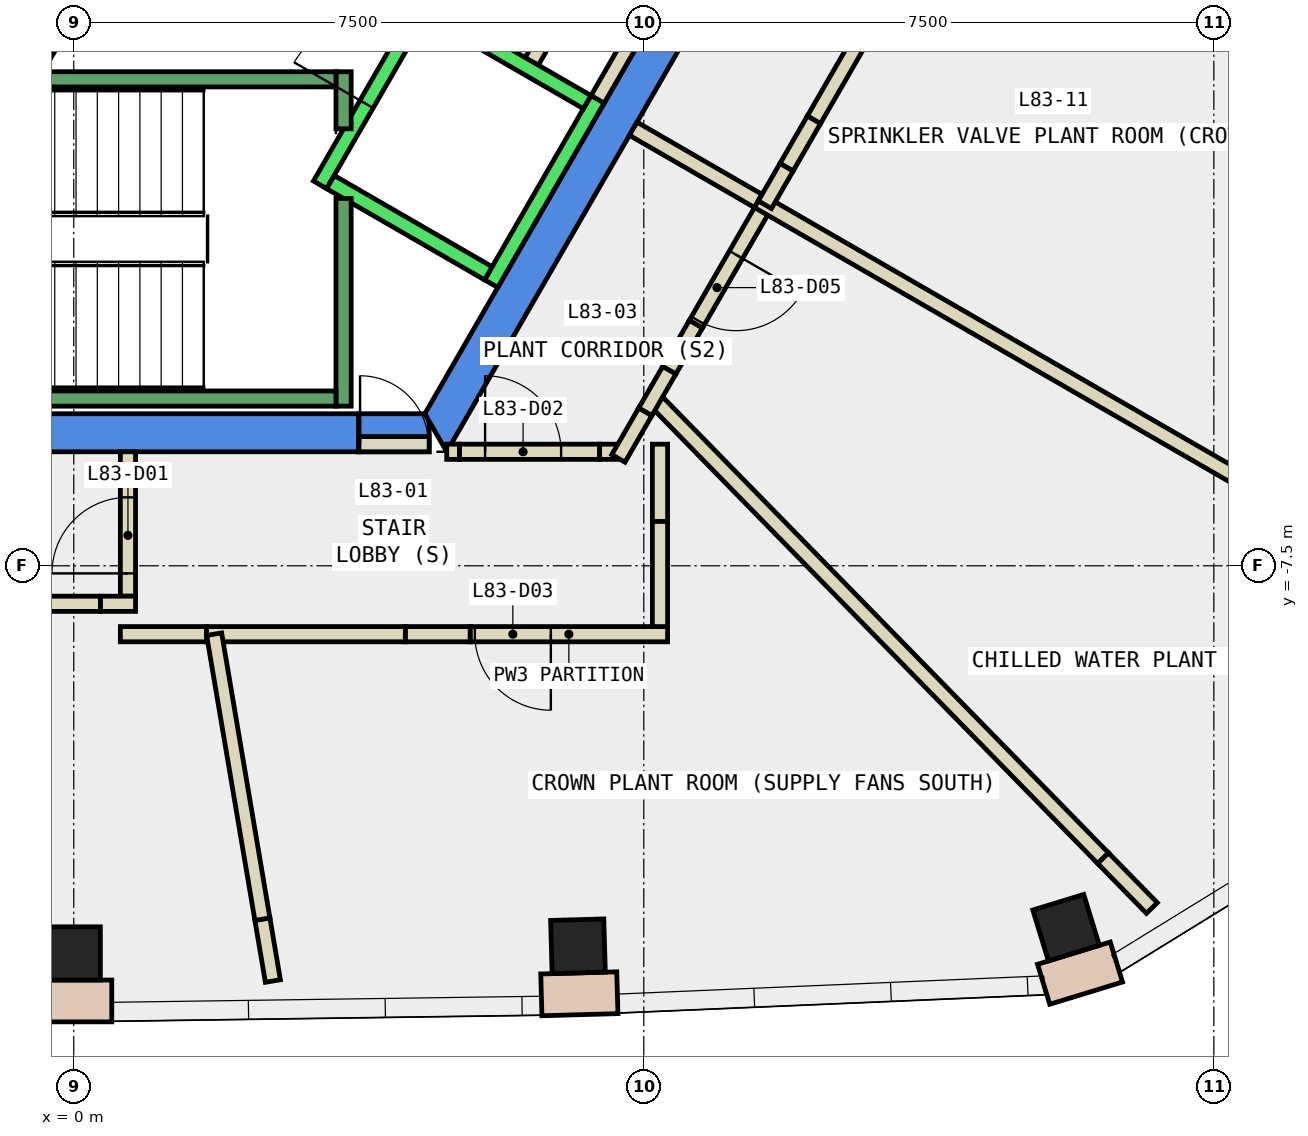
"""IFC4 building model, lengths in metres.
Left out: names, types, materials, properties, quantities, classifications, styles, units other than length and angle.
Written with IfcOpenShell. Run it as: python <this file> out.ifc"""

import sys

from ifc_helpers import new_model, si_unit, direction, frame, frame_2d, origin, origin_2d, place, context, subcontext, project, spatial, polyline, rectangle, outline, extrude, element, fill, save


model = new_model("IFC4")
c1 = context("Model", 3, precision=1e-05, world=origin(), true_north=direction((0.0, 1.0)))
c2 = subcontext(c1, "Body", "Model", "MODEL_VIEW")
j1 = project(units=[si_unit("LENGTHUNIT", "METRE"), si_unit("PLANEANGLEUNIT", "RADIAN")], contexts=[c1])
p1 = place(None, origin())
s1 = spatial("IfcSite", under=j1, at=p1, CompositionType="ELEMENT")
p2 = place(p1, origin())
s2 = spatial("IfcBuilding", under=s1, at=p2, CompositionType="ELEMENT")
p3 = place(p2, frame((0.0, 0.0, 353.9)))
s3 = spatial("IfcBuildingStorey", under=s2, at=p3, CompositionType="ELEMENT", Elevation=353.9)
for number, where, z_axis, x_axis in (
    (1, (0.0, -12.6, -0.35), (0.0, 0.0, 1.0), (1.0, 0.0, 0.0)),
    (2, (6.634, -12.506, -0.35), (0.0, 0.0, 1.0), (1.0, 0.028, 0.0)),
    (3, (13.056, -12.261, -0.35), (0.0, 0.0, 1.0), (0.956, 0.293, 0.0)),
):
    element("IfcColumn", number, at=place(p3, frame(where, z_axis=z_axis, x_axis=x_axis)), inside=s3, PredefinedType="COLUMN", context=c2, shape_type="SweptSolid", body=[
        extrude(rectangle(XDim=0.7, YDim=0.7, at=origin_2d()), origin(), (0.0, 0.0, 1.0), 4.4),
    ])
p4 = place(p3, frame((0.0, 0.0, -0.35)))
e4 = element("IfcWall", 4, at=p4, inside=s3, PredefinedType="SHEAR", context=c2, shape_type="SweptSolid", body=[
    extrude(outline(polyline([(3.75, -6.0), (3.75, -5.5), (-4.619, -5.5), (-4.907, -6.0), (3.75, -6.0)])), origin(), (0.0, 0.0, 1.0), 4.4),
])
p5 = place(p3, frame((0.0, 0.0, 3.6)))
e5 = element("IfcWall", 5, at=p5, inside=s3, PredefinedType="SHEAR", context=c2, shape_type="SweptSolid", body=[
    extrude(outline(polyline([(4.676, -6.0), (4.676, -5.6), (4.619, -5.5), (3.75, -5.5), (3.75, -6.0), (4.676, -6.0)])), origin(), (0.0, 0.0, 1.0), 0.45),
])
p6 = place(p3, frame((0.0, 0.0, -0.35)))
e6 = element("IfcWall", 6, at=p6, inside=s3, PredefinedType="SHEAR", context=c2, shape_type="SweptSolid", body=[
    extrude(outline(polyline([(4.907, -6.0), (9.815, 2.5), (9.238, 2.5), (4.619, -5.5), (4.907, -6.0)])), origin(), (0.0, 0.0, 1.0), 4.4),
])
p7 = place(p3, frame((-0.5, -13.225, 0.0), z_axis=(0.0, 0.0, 1.0), x_axis=(1.0, 0.0, 0.0)))
e7 = element("IfcWall", 7, at=p7, inside=s3, PredefinedType="STANDARD", context=c2, shape_type="SweptSolid", body=[
    extrude(rectangle(XDim=1.0, YDim=0.55, at=frame_2d((0.5, 0.0))), origin(), (0.0, 0.0, 1.0), 4.05),
])
p8 = place(p3, frame((6.152, -13.145, 0.0), z_axis=(0.0, 0.0, 1.0), x_axis=(0.999606097148, 0.028065112591, 0.0)))
e8 = element("IfcWall", 8, at=p8, inside=s3, PredefinedType="STANDARD", context=c2, shape_type="SweptSolid", body=[
    extrude(rectangle(XDim=1.0, YDim=0.55, at=frame_2d((0.5, 0.0))), origin(), (0.0, 0.0, 1.0), 4.05),
])
p9 = place(p3, frame((12.761, -13.006, 0.0), z_axis=(0.0, 0.0, 1.0), x_axis=(0.95613166039, 0.292937276563, 0.0)))
e9 = element("IfcWall", 9, at=p9, inside=s3, PredefinedType="STANDARD", context=c2, shape_type="SweptSolid", body=[
    extrude(rectangle(XDim=1.001, YDim=0.55, at=frame_2d((0.5, 0.0))), origin(), (0.0, 0.0, 1.0), 4.05),
])
p10 = place(p3, frame((6.826, 0.522, 0.0), z_axis=(0.0, 0.0, 1.0), x_axis=(-0.500016722714, -0.866015748706, 0.0)))
e10 = element("IfcWall", 10, at=p10, inside=s3, PredefinedType="PARTITIONING", context=c2, shape_type="SweptSolid", body=[
    extrude(rectangle(XDim=1.7, YDim=0.2, at=frame_2d((0.85, 0.0))), origin(), (0.0, 0.0, 1.0), 4.05),
])
p11 = place(p3, frame((8.192, 0.888, 0.0), z_axis=(0.0, 0.0, 1.0), x_axis=(-0.499940625693, -0.866059680843, 0.0)))
e11 = element("IfcWall", 11, at=p11, inside=s3, PredefinedType="PARTITIONING", context=c2, shape_type="SweptSolid", body=[
    extrude(rectangle(XDim=2.68, YDim=0.2, at=frame_2d((1.34, 0.0))), origin(), (0.0, 0.0, 1.0), 4.05),
])
p12 = place(p3, frame((-0.52, -1.0, 0.0), z_axis=(0.0, 0.0, 1.0), x_axis=(0.50011622646, 0.865958290007, 0.0)))
e12 = element("IfcWall", 12, at=p12, inside=s3, PredefinedType="PARTITIONING", context=c2, shape_type="SweptSolid", body=[
    extrude(rectangle(XDim=4.991, YDim=0.2, at=frame_2d((2.496, 0.0))), origin(), (0.0, 0.0, 1.0), 4.05),
])
p13 = place(p12, frame((1.945, 0.0, 0.0)))
e13 = element("IfcOpeningElement", 13, at=p13, cuts=e12, PredefinedType="OPENING", context=c2, shape_type="SweptSolid", body=[
    extrude(rectangle(XDim=1.0, YDim=2.1, at=frame_2d((0.5, 1.05))), frame((0.0, 0.11, 0.0), z_axis=(0.0, -1.0, 0.0), x_axis=(1.0, 0.0, 0.0)), (0.0, 0.0, 1.0), 0.22),
])
p14 = place(p3, frame((0.713, -7.9, 0.0), z_axis=(0.0, 0.0, 1.0), x_axis=(0.0, 1.0, 0.0)))
e14 = element("IfcWall", 14, at=p14, inside=s3, PredefinedType="PARTITIONING", context=c2, shape_type="SweptSolid", body=[
    extrude(rectangle(XDim=1.9, YDim=0.2, at=frame_2d((0.95, 0.0))), origin(), (0.0, 0.0, 1.0), 4.05),
])
p15 = place(p14, frame((0.3, 0.0, 0.0)))
e15 = element("IfcOpeningElement", 15, at=p15, cuts=e14, PredefinedType="OPENING", context=c2, shape_type="SweptSolid", body=[
    extrude(rectangle(XDim=1.0, YDim=2.1, at=frame_2d((0.5, 1.05))), frame((0.0, 0.11, 0.0), z_axis=(0.0, -1.0, 0.0), x_axis=(1.0, 0.0, 0.0)), (0.0, 0.0, 1.0), 0.22),
])
p16 = place(p3, frame((4.907, -6.0, 0.0), z_axis=(0.0, 0.0, 1.0), x_axis=(1.0, 0.0, 0.0)))
e16 = element("IfcWall", 16, at=p16, inside=s3, PredefinedType="PARTITIONING", context=c2, shape_type="SweptSolid", body=[
    extrude(rectangle(XDim=0.169, YDim=0.2, at=frame_2d((0.084, 0.0))), origin(), (0.0, 0.0, 1.0), 2.4),
])
p17 = place(p3, frame((7.813, -8.4, 0.0), z_axis=(0.0, 0.0, 1.0), x_axis=(-1.0, 0.0, 0.0)))
e17 = element("IfcWall", 17, at=p17, inside=s3, PredefinedType="PARTITIONING", context=c2, shape_type="SweptSolid", body=[
    extrude(rectangle(XDim=2.598, YDim=0.2, at=frame_2d((1.299, 0.0))), origin(), (0.0, 0.0, 1.0), 4.05),
])
p18 = place(p17, frame((1.536, 0.0, 0.0)))
e18 = element("IfcOpeningElement", 18, at=p18, cuts=e17, PredefinedType="OPENING", context=c2, shape_type="SweptSolid", body=[
    extrude(rectangle(XDim=1.0, YDim=2.1, at=frame_2d((0.5, 1.05))), frame((0.0, 0.11, 0.0), z_axis=(0.0, -1.0, 0.0), x_axis=(1.0, 0.0, 0.0)), (0.0, 0.0, 1.0), 0.22),
])
p19 = place(p3, frame((7.713, -5.9, 0.0), z_axis=(0.0, 0.0, 1.0), x_axis=(0.0, -1.0, 0.0)))
e19 = element("IfcWall", 19, at=p19, inside=s3, PredefinedType="PARTITIONING", context=c2, shape_type="SweptSolid", body=[
    extrude(rectangle(XDim=1.017, YDim=0.2, at=frame_2d((0.509, 0.0))), origin(), (0.0, 0.0, 1.0), 1.95),
])
p20 = place(p3, frame((1.747, -8.4, 0.0), z_axis=(0.0, 0.0, 1.0), x_axis=(-1.0, 0.0, 0.0)))
e20 = element("IfcWall", 20, at=p20, inside=s3, PredefinedType="PARTITIONING", context=c2, shape_type="SweptSolid", body=[
    extrude(rectangle(XDim=1.134, YDim=0.2, at=frame_2d((0.567, 0.0))), origin(), (0.0, 0.0, 1.0), 4.05),
])
p21 = place(p3, frame((0.813, -8.0, 0.0), z_axis=(0.0, 0.0, 1.0), x_axis=(-1.0, 0.0, 0.0)))
e21 = element("IfcWall", 21, at=p21, inside=s3, PredefinedType="PARTITIONING", context=c2, shape_type="SweptSolid", body=[
    extrude(rectangle(XDim=0.463, YDim=0.2, at=frame_2d((0.231, 0.0))), origin(), (0.0, 0.0, 1.0), 4.05),
])
p22 = place(p3, frame((9.093, -2.75, 0.0), z_axis=(0.0, 0.0, 1.0), x_axis=(-0.500145398563, -0.865941441609, 0.0)))
e22 = element("IfcWall", 22, at=p22, inside=s3, PredefinedType="PARTITIONING", context=c2, shape_type="SweptSolid", body=[
    extrude(rectangle(XDim=1.815, YDim=0.2, at=frame_2d((0.908, 0.0))), origin(), (0.0, 0.0, 1.0), 4.05),
])
p23 = place(p22, frame((0.759, 0.0, 0.0)))
e23 = element("IfcOpeningElement", 23, at=p23, cuts=e22, PredefinedType="OPENING", context=c2, shape_type="SweptSolid", body=[
    extrude(rectangle(XDim=1.0, YDim=2.1, at=frame_2d((0.5, 1.05))), frame((0.0, 0.11, 0.0), z_axis=(0.0, -1.0, 0.0), x_axis=(1.0, 0.0, 0.0)), (0.0, 0.0, 1.0), 0.22),
])
p24 = place(p3, frame((7.361, -1.75, 0.0), z_axis=(0.0, 0.0, 1.0), x_axis=(0.865980106173, -0.500078449558, 0.0)))
e24 = element("IfcWall", 24, at=p24, inside=s3, PredefinedType="PARTITIONING", context=c2, shape_type="SweptSolid", body=[
    extrude(rectangle(XDim=1.9, YDim=0.2, at=frame_2d((0.95, 0.0))), origin(), (0.0, 0.0, 1.0), 4.05),
])
p25 = place(p3, frame((2.62, -12.963, 0.0), z_axis=(0.0, 0.0, 1.0), x_axis=(-0.167371315192, 0.985893930832, 0.0)))
e25 = element("IfcWall", 25, at=p25, inside=s3, PredefinedType="PARTITIONING", context=c2, shape_type="SweptSolid", body=[
    extrude(rectangle(XDim=0.826, YDim=0.2, at=frame_2d((0.413, 0.0))), origin(), (0.0, 0.0, 1.0), 1.95),
])
p26 = place(p3, frame((7.624, -5.295, 0.0), z_axis=(0.0, 0.0, 1.0), x_axis=(0.699204125851, -0.714922086938, 0.0)))
e26 = element("IfcWall", 26, at=p26, inside=s3, PredefinedType="PARTITIONING", context=c2, shape_type="SweptSolid", body=[
    extrude(rectangle(XDim=8.465, YDim=0.2, at=frame_2d((4.233, 0.0))), origin(), (0.0, 0.0, 1.0), 4.05),
])
p27 = place(p3, frame((9.006, -2.7, 0.0), z_axis=(0.0, 0.0, 1.0), x_axis=(0.866026229868, -0.499998569178, 0.0)))
e27 = element("IfcWall", 27, at=p27, inside=s3, PredefinedType="PARTITIONING", context=c2, shape_type="SweptSolid", body=[
    extrude(rectangle(XDim=8.572, YDim=0.2, at=frame_2d((4.286, 0.0))), origin(), (0.0, 0.0, 1.0), 4.05),
])
p28 = place(p3, frame((3.75, -5.9, 0.0), z_axis=(0.0, 0.0, 1.0), x_axis=(1.0, 0.0, 0.0)))
e28 = element("IfcWall", 28, at=p28, inside=s3, PredefinedType="PARTITIONING", context=c2, shape_type="SweptSolid", body=[
    extrude(rectangle(XDim=0.926, YDim=0.2, at=frame_2d((0.463, 0.0))), origin(), (0.0, 0.0, 1.0), 2.4),
])
p29 = place(p28, frame((0.017, 0.0, 0.0)))
e29 = element("IfcOpeningElement", 29, at=p29, cuts=e28, PredefinedType="OPENING", context=c2, shape_type="SweptSolid", body=[
    extrude(rectangle(XDim=0.9, YDim=2.1, at=frame_2d((0.45, 1.05))), frame((0.0, 0.11, 0.0), z_axis=(0.0, -1.0, 0.0), x_axis=(1.0, 0.0, 0.0)), (0.0, 0.0, 1.0), 0.22),
])
p30 = place(p3, frame((5.076, -6.0, 0.0), z_axis=(0.0, 0.0, 1.0), x_axis=(1.0, 0.0, 0.0)))
e30 = element("IfcWall", 30, at=p30, inside=s3, PredefinedType="PARTITIONING", context=c2, shape_type="SweptSolid", body=[
    extrude(rectangle(XDim=1.843, YDim=0.2, at=frame_2d((0.921, 0.0))), origin(), (0.0, 0.0, 1.0), 4.05),
])
p31 = place(p30, frame((0.336, 0.0, 0.0)))
e31 = element("IfcOpeningElement", 31, at=p31, cuts=e30, PredefinedType="OPENING", context=c2, shape_type="SweptSolid", body=[
    extrude(rectangle(XDim=1.0, YDim=2.1, at=frame_2d((0.5, 1.05))), frame((0.0, 0.11, 0.0), z_axis=(0.0, -1.0, 0.0), x_axis=(1.0, 0.0, 0.0)), (0.0, 0.0, 1.0), 0.22),
])
p32 = place(p3, frame((6.919, -6.0, 0.0), z_axis=(0.0, 0.0, 1.0), x_axis=(1.0, 0.0, 0.0)))
e32 = element("IfcWall", 32, at=p32, inside=s3, PredefinedType="PARTITIONING", context=c2, shape_type="SweptSolid", body=[
    extrude(rectangle(XDim=0.242, YDim=0.2, at=frame_2d((0.121, 0.0))), origin(), (0.0, 0.0, 1.0), 1.95),
])
p33 = place(p3, frame((5.215, -8.4, 0.0), z_axis=(0.0, 0.0, 1.0), x_axis=(-1.0, 0.0, 0.0)))
e33 = element("IfcWall", 33, at=p33, inside=s3, PredefinedType="PARTITIONING", context=c2, shape_type="SweptSolid", body=[
    extrude(rectangle(XDim=0.853, YDim=0.2, at=frame_2d((0.427, 0.0))), origin(), (0.0, 0.0, 1.0), 1.95),
])
p34 = place(p3, frame((4.362, -8.4, 0.0), z_axis=(0.0, 0.0, 1.0), x_axis=(-1.0, 0.0, 0.0)))
e34 = element("IfcWall", 34, at=p34, inside=s3, PredefinedType="PARTITIONING", context=c2, shape_type="SweptSolid", body=[
    extrude(rectangle(XDim=2.615, YDim=0.2, at=frame_2d((1.308, 0.0))), origin(), (0.0, 0.0, 1.0), 4.05),
])
p35 = place(p3, frame((7.713, -6.917, 0.0), z_axis=(0.0, 0.0, 1.0), x_axis=(0.0, -1.0, 0.0)))
e35 = element("IfcWall", 35, at=p35, inside=s3, PredefinedType="PARTITIONING", context=c2, shape_type="SweptSolid", body=[
    extrude(rectangle(XDim=1.383, YDim=0.2, at=frame_2d((0.691, 0.0))), origin(), (0.0, 0.0, 1.0), 4.05),
])
p36 = place(p3, frame((0.35, -8.0, 0.0), z_axis=(0.0, 0.0, 1.0), x_axis=(-1.0, 0.0, 0.0)))
e36 = element("IfcWall", 36, at=p36, inside=s3, PredefinedType="PARTITIONING", context=c2, shape_type="SweptSolid", body=[
    extrude(rectangle(XDim=0.7, YDim=0.2, at=frame_2d((0.35, 0.0))), origin(), (0.0, 0.0, 1.0), 1.95),
])
p37 = place(p3, frame((8.185, -4.322, 0.0), z_axis=(0.0, 0.0, 1.0), x_axis=(-0.500265973451, -0.865871789474, 0.0)))
e37 = element("IfcWall", 37, at=p37, inside=s3, PredefinedType="PARTITIONING", context=c2, shape_type="SweptSolid", body=[
    extrude(rectangle(XDim=0.7, YDim=0.2, at=frame_2d((0.35, 0.0))), origin(), (0.0, 0.0, 1.0), 1.95),
])
p38 = place(p3, frame((7.835, -4.928, 0.0), z_axis=(0.0, 0.0, 1.0), x_axis=(-0.500045805297, -0.865998956469, 0.0)))
e38 = element("IfcWall", 38, at=p38, inside=s3, PredefinedType="PARTITIONING", context=c2, shape_type="SweptSolid", body=[
    extrude(rectangle(XDim=0.632, YDim=0.2, at=frame_2d((0.316, 0.0))), origin(), (0.0, 0.0, 1.0), 4.05),
])
p39 = place(p3, frame((7.519, -5.475, 0.0), z_axis=(0.0, 0.0, 1.0), x_axis=(-0.499782295163, -0.866151059251, 0.0)))
e39 = element("IfcWall", 39, at=p39, inside=s3, PredefinedType="PARTITIONING", context=c2, shape_type="SweptSolid", body=[
    extrude(rectangle(XDim=0.706, YDim=0.2, at=frame_2d((0.353, 0.0))), origin(), (0.0, 0.0, 1.0), 1.95),
])
p40 = place(p3, frame((2.482, -12.149, 0.0), z_axis=(0.0, 0.0, 1.0), x_axis=(-0.167001385459, 0.985956660941, 0.0)))
e40 = element("IfcWall", 40, at=p40, inside=s3, PredefinedType="PARTITIONING", context=c2, shape_type="SweptSolid", body=[
    extrude(rectangle(XDim=3.802, YDim=0.2, at=frame_2d((1.901, 0.0))), origin(), (0.0, 0.0, 1.0), 4.05),
])
p41 = place(p3, frame((13.543, -11.347, 0.0), z_axis=(0.0, 0.0, 1.0), x_axis=(0.699486169187, -0.714646135592, 0.0)))
e41 = element("IfcWall", 41, at=p41, inside=s3, PredefinedType="PARTITIONING", context=c2, shape_type="SweptSolid", body=[
    extrude(rectangle(XDim=0.918, YDim=0.2, at=frame_2d((0.459, 0.0))), origin(), (0.0, 0.0, 1.0), 1.95),
])
p42 = place(p3, frame((10.896, 0.372, 0.0), z_axis=(0.0, 0.0, 1.0), x_axis=(-0.500096650539, -0.865969595378, 0.0)))
e42 = element("IfcWall", 42, at=p42, inside=s3, PredefinedType="PARTITIONING", context=c2, shape_type="SweptSolid", body=[
    extrude(rectangle(XDim=2.315, YDim=0.2, at=frame_2d((1.158, 0.0))), origin(), (0.0, 0.0, 1.0), 4.05),
])
p43 = place(p3, frame((9.738, -1.633, 0.0), z_axis=(0.0, 0.0, 1.0), x_axis=(-0.499820234884, -0.866129166349, 0.0)))
e43 = element("IfcWall", 43, at=p43, inside=s3, PredefinedType="PARTITIONING", context=c2, shape_type="SweptSolid", body=[
    extrude(rectangle(XDim=0.72, YDim=0.2, at=frame_2d((0.36, 0.0))), origin(), (0.0, 0.0, 1.0), 1.95),
])
p44 = place(p3, frame((9.378, -2.257, 0.0), z_axis=(0.0, 0.0, 1.0), x_axis=(-0.500427620203, -0.86577837634, 0.0)))
e44 = element("IfcWall", 44, at=p44, inside=s3, PredefinedType="PARTITIONING", context=c2, shape_type="SweptSolid", body=[
    extrude(rectangle(XDim=0.569, YDim=0.2, at=frame_2d((0.285, 0.0))), origin(), (0.0, 0.0, 1.0), 4.05),
])
p45 = place(p3, frame((3.24, -2.488, 0.0), z_axis=(0.0, 0.0, 1.0), x_axis=(0.49994636267, 0.866056369097, 0.0)))
e45 = element("IfcWall", 45, at=p45, inside=s3, PredefinedType="STANDARD", context=c2, shape_type="SweptSolid", body=[
    extrude(rectangle(XDim=2.8, YDim=0.2, at=frame_2d((1.4, 0.0))), origin(), (0.0, 0.0, 1.0), 4.05),
])
p46 = place(p45, frame((1.225, 0.0, 0.0)))
e46 = element("IfcOpeningElement", 46, at=p46, cuts=e45, PredefinedType="OPENING", context=c2, shape_type="SweptSolid", body=[
    extrude(rectangle(XDim=1.1, YDim=2.1, at=frame_2d((0.55, 1.05))), frame((0.0, 0.11, 0.0), z_axis=(0.0, -1.0, 0.0), x_axis=(1.0, 0.0, 0.0)), (0.0, 0.0, 1.0), 0.22),
])
p47 = place(p3, frame((5.492, -3.788, 0.0), z_axis=(0.0, 0.0, 1.0), x_axis=(0.500011755427, 0.866018616679, 0.0)))
e47 = element("IfcWall", 47, at=p47, inside=s3, PredefinedType="STANDARD", context=c2, shape_type="SweptSolid", body=[
    extrude(rectangle(XDim=2.8, YDim=0.2, at=frame_2d((1.4, 0.0))), origin(), (0.0, 0.0, 1.0), 4.05),
])
p48 = place(p3, frame((3.377, -2.452, 0.0), z_axis=(0.0, 0.0, 1.0), x_axis=(0.865955154139, -0.50012165622, 0.0)))
e48 = element("IfcWall", 48, at=p48, inside=s3, PredefinedType="STANDARD", context=c2, shape_type="SweptSolid", body=[
    extrude(rectangle(XDim=2.4, YDim=0.2, at=frame_2d((1.2, 0.0))), origin(), (0.0, 0.0, 1.0), 4.05),
])
p49 = place(p3, frame((4.677, -0.2, 0.0), z_axis=(0.0, 0.0, 1.0), x_axis=(0.865973769406, -0.500089422704, 0.0)))
e49 = element("IfcWall", 49, at=p49, inside=s3, PredefinedType="STANDARD", context=c2, shape_type="SweptSolid", body=[
    extrude(rectangle(XDim=2.399, YDim=0.2, at=frame_2d((1.2, 0.0))), origin(), (0.0, 0.0, 1.0), 4.05),
])
p50 = place(p3, frame((3.55, -2.667, 0.0), z_axis=(0.0, 0.0, 1.0), x_axis=(0.0, -1.0, 0.0)))
e50 = element("IfcWall", 50, at=p50, inside=s3, PredefinedType="STANDARD", context=c2, shape_type="SweptSolid", body=[
    extrude(rectangle(XDim=2.733, YDim=0.2, at=frame_2d((1.366, 0.0))), origin(), (0.0, 0.0, 1.0), 4.05),
])
p51 = place(p3, frame((3.55, -1.0, 0.0), z_axis=(0.0, 0.0, 1.0), x_axis=(0.0, -1.0, 0.0)))
e51 = element("IfcWall", 51, at=p51, inside=s3, PredefinedType="STANDARD", context=c2, shape_type="SweptSolid", body=[
    extrude(rectangle(XDim=0.751, YDim=0.2, at=frame_2d((0.375, 0.0))), origin(), (0.0, 0.0, 1.0), 4.05),
])
p52 = place(p3, frame((-3.45, -1.1, 0.0), z_axis=(0.0, 0.0, 1.0), x_axis=(1.0, 0.0, 0.0)))
e52 = element("IfcWall", 52, at=p52, inside=s3, PredefinedType="STANDARD", context=c2, shape_type="SweptSolid", body=[
    extrude(rectangle(XDim=6.9, YDim=0.2, at=frame_2d((3.45, 0.0))), origin(), (0.0, 0.0, 1.0), 4.05),
])
p53 = place(p52, frame((0.45, 0.0, 0.0)))
e53 = element("IfcOpeningElement", 53, at=p53, cuts=e52, PredefinedType="OPENING", context=c2, shape_type="SweptSolid", body=[
    extrude(rectangle(XDim=1.1, YDim=2.2, at=frame_2d((0.55, 1.1))), frame((0.0, 0.11, 0.0), z_axis=(0.0, -1.0, 0.0), x_axis=(1.0, 0.0, 0.0)), (0.0, 0.0, 1.0), 0.22),
])
p54 = place(p3, frame((-3.45, -5.3, 0.0), z_axis=(0.0, 0.0, 1.0), x_axis=(1.0, 0.0, 0.0)))
e54 = element("IfcWall", 54, at=p54, inside=s3, PredefinedType="STANDARD", context=c2, shape_type="SweptSolid", body=[
    extrude(rectangle(XDim=6.9, YDim=0.2, at=frame_2d((3.45, 0.0))), origin(), (0.0, 0.0, 1.0), 4.05),
])
p55 = place(p15, origin())
e55 = element("IfcDoor", 55, at=p55, inside=s3, OperationType="SINGLE_SWING_LEFT", PredefinedType="DOOR", context=c2, shape_type="SweptSolid", body=[
    extrude(rectangle(XDim=1.0, YDim=2.1, at=frame_2d((0.5, 1.05))), frame((0.0, 0.025, 0.0), z_axis=(0.0, -1.0, 0.0), x_axis=(1.0, 0.0, 0.0)), (0.0, 0.0, 1.0), 0.05),
])
fill(e15, e55)
p56 = place(p31, origin())
e56 = element("IfcDoor", 56, at=p56, inside=s3, OperationType="SINGLE_SWING_RIGHT", PredefinedType="DOOR", context=c2, shape_type="SweptSolid", body=[
    extrude(rectangle(XDim=1.0, YDim=2.1, at=frame_2d((0.5, 1.05))), frame((0.0, 0.025, 0.0), z_axis=(0.0, -1.0, 0.0), x_axis=(1.0, 0.0, 0.0)), (0.0, 0.0, 1.0), 0.05),
])
fill(e31, e56)
p57 = place(p18, origin())
e57 = element("IfcDoor", 57, at=p57, inside=s3, OperationType="SINGLE_SWING_LEFT", PredefinedType="DOOR", context=c2, shape_type="SweptSolid", body=[
    extrude(rectangle(XDim=1.0, YDim=2.1, at=frame_2d((0.5, 1.05))), frame((0.0, 0.025, 0.0), z_axis=(0.0, -1.0, 0.0), x_axis=(1.0, 0.0, 0.0)), (0.0, 0.0, 1.0), 0.05),
])
fill(e18, e57)
p58 = place(p23, origin())
e58 = element("IfcDoor", 58, at=p58, inside=s3, OperationType="SINGLE_SWING_LEFT", PredefinedType="DOOR", context=c2, shape_type="SweptSolid", body=[
    extrude(rectangle(XDim=1.0, YDim=2.1, at=frame_2d((0.5, 1.05))), frame((0.0, 0.025, 0.0), z_axis=(0.0, -1.0, 0.0), x_axis=(1.0, 0.0, 0.0)), (0.0, 0.0, 1.0), 0.05),
])
fill(e23, e58)
p59 = place(p29, origin())
e59 = element("IfcDoor", 59, at=p59, inside=s3, OperationType="SINGLE_SWING_LEFT", PredefinedType="DOOR", context=c2, shape_type="SweptSolid", body=[
    extrude(rectangle(XDim=0.9, YDim=2.1, at=frame_2d((0.45, 1.05))), frame((0.0, 0.025, 0.0), z_axis=(0.0, -1.0, 0.0), x_axis=(1.0, 0.0, 0.0)), (0.0, 0.0, 1.0), 0.05),
])
fill(e29, e59)
p60 = place(p46, origin())
e60 = element("IfcDoor", 60, at=p60, inside=s3, OperationType="SLIDING_TO_LEFT", PredefinedType="DOOR", context=c2, shape_type="SweptSolid", body=[
    extrude(rectangle(XDim=1.1, YDim=2.1, at=frame_2d((0.55, 1.05))), frame((0.0, 0.025, 0.0), z_axis=(0.0, -1.0, 0.0), x_axis=(1.0, 0.0, 0.0)), (0.0, 0.0, 1.0), 0.05),
])
fill(e46, e60)
save(model, sys.argv[1])
